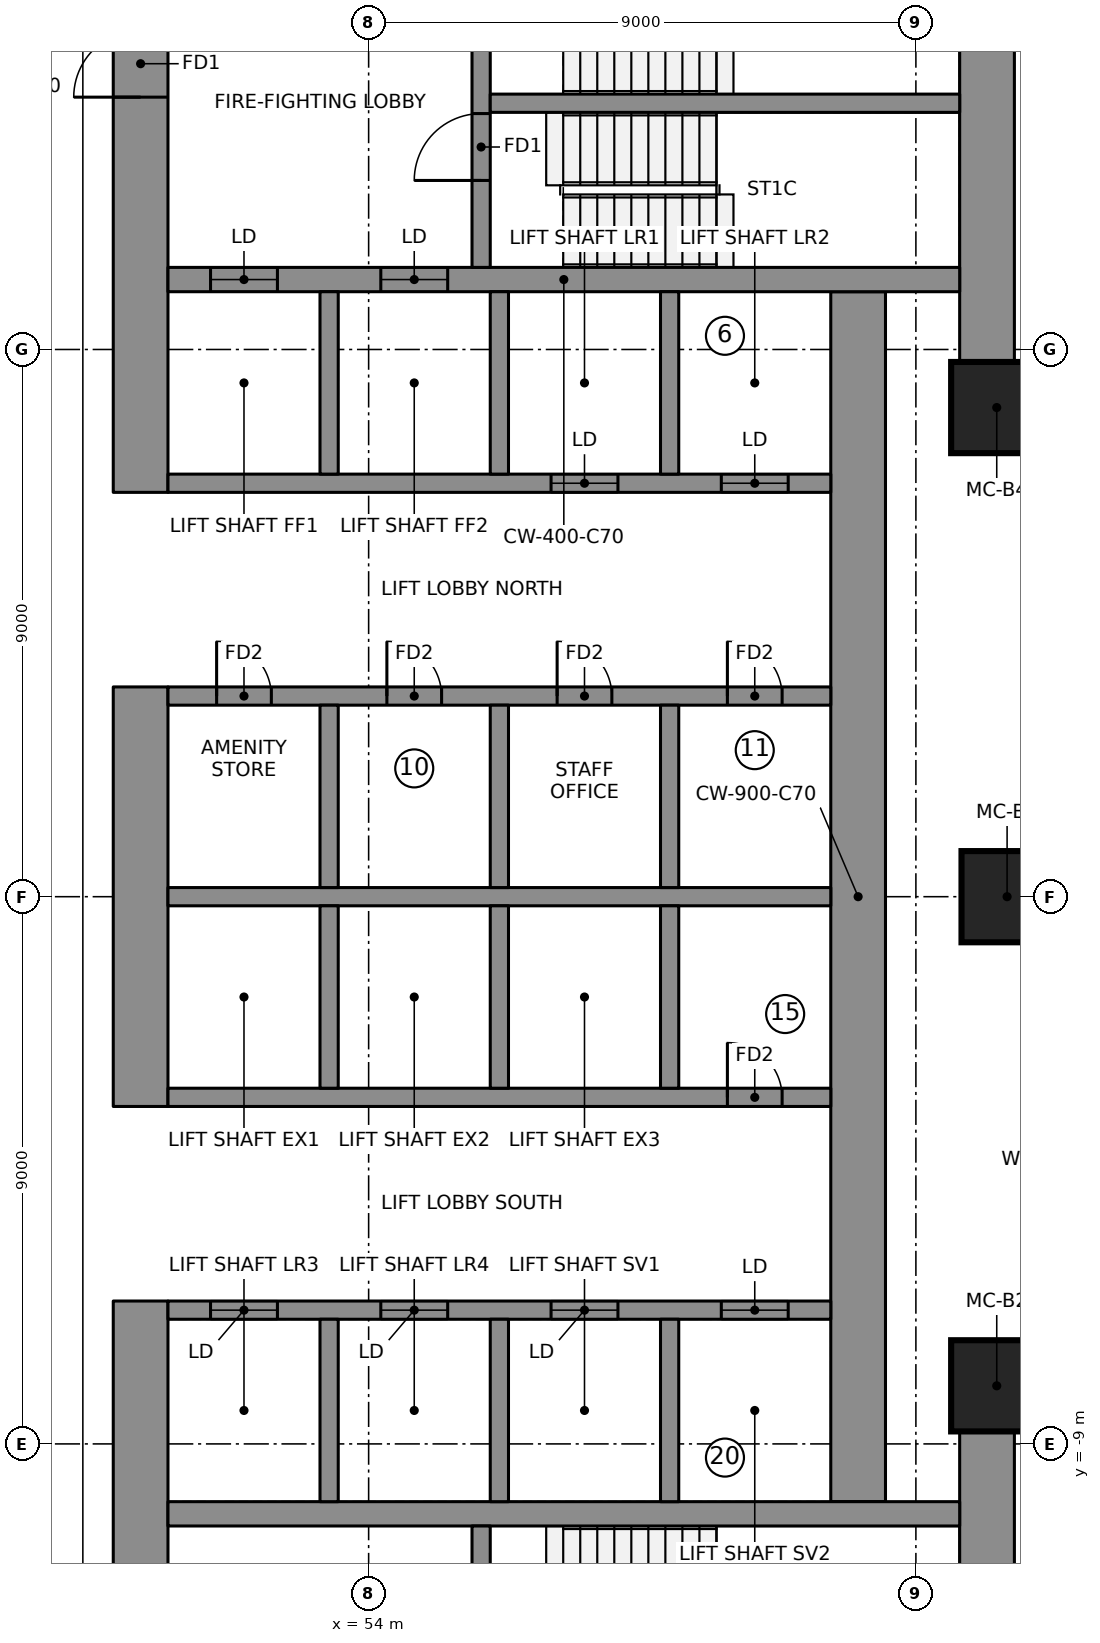
"""IFC4 building model, lengths in metres.
Left out: names, types, materials, properties, quantities, classifications, styles, units other than length and angle.
Written with IfcOpenShell. Run it as: python <this file> out.ifc"""

import sys

from ifc_helpers import new_model, si_unit, direction, frame, frame_2d, origin, origin_2d, place, context, subcontext, project, spatial, rectangle, extrude, element, fill, save


model = new_model("IFC4")
c1 = context("Model", 3, precision=1e-05, world=origin(), true_north=direction((0.0, 1.0)))
c2 = subcontext(c1, "Body", "Model", "MODEL_VIEW")
j1 = project(units=[si_unit("LENGTHUNIT", "METRE"), si_unit("PLANEANGLEUNIT", "RADIAN")], contexts=[c1])
p1 = place(None, origin())
s1 = spatial("IfcSite", under=j1, at=p1, CompositionType="ELEMENT")
p2 = place(p1, origin())
s2 = spatial("IfcBuilding", under=s1, at=p2, CompositionType="ELEMENT")
p3 = place(p2, frame((0.0, 0.0, 162.15)))
s3 = spatial("IfcBuildingStorey", under=s2, at=p3, CompositionType="ELEMENT", Elevation=162.15)
p4 = place(p3, frame((50.25, 6.65, 0.0), z_axis=(0.0, 0.0, 1.0), x_axis=(0.0, 1.0, 0.0)))
e1 = element("IfcWall", 1, at=p4, inside=s3, PredefinedType="SHEAR", context=c2, shape_type="SweptSolid", body=[
    extrude(rectangle(XDim=10.0, YDim=0.9, at=frame_2d((5.0, 0.0))), origin(), (0.0, 0.0, 1.0), 3.55),
])
p5 = place(p4, frame((6.5, 0.0, 0.0)))
e2 = element("IfcOpeningElement", 2, at=p5, cuts=e1, PredefinedType="OPENING", context=c2, shape_type="SweptSolid", body=[
    extrude(rectangle(XDim=1.1, YDim=2.1, at=frame_2d((0.55, 1.05))), frame((0.0, 0.46, 0.0), z_axis=(0.0, -1.0, 0.0), x_axis=(1.0, 0.0, 0.0)), (0.0, 0.0, 1.0), 0.92),
])
p6 = place(p3, frame((50.25, -3.45, 0.0), z_axis=(0.0, 0.0, 1.0), x_axis=(0.0, 1.0, 0.0)))
e3 = element("IfcWall", 3, at=p6, inside=s3, PredefinedType="SHEAR", context=c2, shape_type="SweptSolid", body=[
    extrude(rectangle(XDim=6.9, YDim=0.9, at=frame_2d((3.45, 0.0))), origin(), (0.0, 0.0, 1.0), 3.55),
])
p7 = place(p3, frame((50.25, -16.65, 0.0), z_axis=(0.0, 0.0, 1.0), x_axis=(0.0, 1.0, 0.0)))
e4 = element("IfcWall", 4, at=p7, inside=s3, PredefinedType="SHEAR", context=c2, shape_type="SweptSolid", body=[
    extrude(rectangle(XDim=10.0, YDim=0.9, at=frame_2d((5.0, 0.0))), origin(), (0.0, 0.0, 1.0), 3.55),
])
p8 = place(p7, frame((2.4, 0.0, 0.0)))
e5 = element("IfcOpeningElement", 5, at=p8, cuts=e4, PredefinedType="OPENING", context=c2, shape_type="SweptSolid", body=[
    extrude(rectangle(XDim=1.1, YDim=2.1, at=frame_2d((0.55, 1.05))), frame((0.0, 0.46, 0.0), z_axis=(0.0, -1.0, 0.0), x_axis=(1.0, 0.0, 0.0)), (0.0, 0.0, 1.0), 0.92),
])
for number, where, z_axis, x_axis in (
    (6, (64.17, 8.745, 0.0), (0.0, 0.0, 1.0), (0.0, 1.0, 0.0)),
    (7, (64.17, -15.75, 0.0), (0.0, 0.0, 1.0), (0.0, 1.0, 0.0)),
):
    element("IfcWall", number, at=place(p3, frame(where, z_axis=z_axis, x_axis=x_axis)), inside=s3, PredefinedType="SHEAR", context=c2, shape_type="SweptSolid", body=[
        extrude(rectangle(XDim=7.005, YDim=0.9, at=frame_2d((3.503, 0.0))), origin(), (0.0, 0.0, 1.0), 3.55),
    ])
p9 = place(p3, frame((62.05, -9.95, 0.0), z_axis=(0.0, 0.0, 1.0), x_axis=(0.0, 1.0, 0.0)))
e8 = element("IfcWall", 8, at=p9, inside=s3, PredefinedType="SHEAR", context=c2, shape_type="SweptSolid", body=[
    extrude(rectangle(XDim=19.9, YDim=0.9, at=frame_2d((9.95, 0.0))), origin(), (0.0, 0.0, 1.0), 3.55),
])
p10 = place(p3, frame((50.7, 10.15, 0.0), z_axis=(0.0, 0.0, 1.0), x_axis=(1.0, 0.0, 0.0)))
e9 = element("IfcWall", 9, at=p10, inside=s3, PredefinedType="SHEAR", context=c2, shape_type="SweptSolid", body=[
    extrude(rectangle(XDim=13.02, YDim=0.4, at=frame_2d((6.51, 0.0))), origin(), (0.0, 0.0, 1.0), 3.55),
])
p11 = place(p10, frame((0.7, 0.0, 0.0)))
e10 = element("IfcOpeningElement", 10, at=p11, cuts=e9, PredefinedType="OPENING", context=c2, shape_type="SweptSolid", body=[
    extrude(rectangle(XDim=1.1, YDim=2.1, at=frame_2d((0.55, 1.05))), frame((0.0, 0.21, 0.0), z_axis=(0.0, -1.0, 0.0), x_axis=(1.0, 0.0, 0.0)), (0.0, 0.0, 1.0), 0.42),
])
p12 = place(p10, frame((3.5, 0.0, 0.0)))
e11 = element("IfcOpeningElement", 11, at=p12, cuts=e9, PredefinedType="OPENING", context=c2, shape_type="SweptSolid", body=[
    extrude(rectangle(XDim=1.1, YDim=2.1, at=frame_2d((0.55, 1.05))), frame((0.0, 0.21, 0.0), z_axis=(0.0, -1.0, 0.0), x_axis=(1.0, 0.0, 0.0)), (0.0, 0.0, 1.0), 0.42),
])
p13 = place(p3, frame((50.7, -10.15, 0.0), z_axis=(0.0, 0.0, 1.0), x_axis=(1.0, 0.0, 0.0)))
e12 = element("IfcWall", 12, at=p13, inside=s3, PredefinedType="SHEAR", context=c2, shape_type="SweptSolid", body=[
    extrude(rectangle(XDim=13.02, YDim=0.4, at=frame_2d((6.51, 0.0))), origin(), (0.0, 0.0, 1.0), 3.55),
])
p14 = place(p3, frame((50.7, 0.0, 0.0), z_axis=(0.0, 0.0, 1.0), x_axis=(1.0, 0.0, 0.0)))
e13 = element("IfcWall", 13, at=p14, inside=s3, PredefinedType="SHEAR", context=c2, shape_type="SweptSolid", body=[
    extrude(rectangle(XDim=10.9, YDim=0.3, at=frame_2d((5.45, 0.0))), origin(), (0.0, 0.0, 1.0), 3.55),
])
p15 = place(p3, frame((50.7, 3.3, 0.0), z_axis=(0.0, 0.0, 1.0), x_axis=(1.0, 0.0, 0.0)))
e14 = element("IfcWall", 14, at=p15, inside=s3, PredefinedType="SHEAR", context=c2, shape_type="SweptSolid", body=[
    extrude(rectangle(XDim=10.9, YDim=0.3, at=frame_2d((5.45, 0.0))), origin(), (0.0, 0.0, 1.0), 3.55),
])
p16 = place(p15, frame((0.8, 0.0, 0.0)))
e15 = element("IfcOpeningElement", 15, at=p16, cuts=e14, PredefinedType="OPENING", context=c2, shape_type="SweptSolid", body=[
    extrude(rectangle(XDim=0.9, YDim=2.1, at=frame_2d((0.45, 1.05))), frame((0.0, 0.16, 0.0), z_axis=(0.0, -1.0, 0.0), x_axis=(1.0, 0.0, 0.0)), (0.0, 0.0, 1.0), 0.32),
])
p17 = place(p15, frame((3.6, 0.0, 0.0)))
e16 = element("IfcOpeningElement", 16, at=p17, cuts=e14, PredefinedType="OPENING", context=c2, shape_type="SweptSolid", body=[
    extrude(rectangle(XDim=0.9, YDim=2.1, at=frame_2d((0.45, 1.05))), frame((0.0, 0.16, 0.0), z_axis=(0.0, -1.0, 0.0), x_axis=(1.0, 0.0, 0.0)), (0.0, 0.0, 1.0), 0.32),
])
p18 = place(p15, frame((6.4, 0.0, 0.0)))
e17 = element("IfcOpeningElement", 17, at=p18, cuts=e14, PredefinedType="OPENING", context=c2, shape_type="SweptSolid", body=[
    extrude(rectangle(XDim=0.9, YDim=2.1, at=frame_2d((0.45, 1.05))), frame((0.0, 0.16, 0.0), z_axis=(0.0, -1.0, 0.0), x_axis=(1.0, 0.0, 0.0)), (0.0, 0.0, 1.0), 0.32),
])
p19 = place(p15, frame((9.2, 0.0, 0.0)))
e18 = element("IfcOpeningElement", 18, at=p19, cuts=e14, PredefinedType="OPENING", context=c2, shape_type="SweptSolid", body=[
    extrude(rectangle(XDim=0.9, YDim=2.1, at=frame_2d((0.45, 1.05))), frame((0.0, 0.16, 0.0), z_axis=(0.0, -1.0, 0.0), x_axis=(1.0, 0.0, 0.0)), (0.0, 0.0, 1.0), 0.32),
])
p20 = place(p3, frame((50.7, 6.8, 0.0), z_axis=(0.0, 0.0, 1.0), x_axis=(1.0, 0.0, 0.0)))
e19 = element("IfcWall", 19, at=p20, inside=s3, PredefinedType="SHEAR", context=c2, shape_type="SweptSolid", body=[
    extrude(rectangle(XDim=10.9, YDim=0.3, at=frame_2d((5.45, 0.0))), origin(), (0.0, 0.0, 1.0), 3.55),
])
p21 = place(p20, frame((6.3, 0.0, 0.0)))
e20 = element("IfcOpeningElement", 20, at=p21, cuts=e19, PredefinedType="OPENING", context=c2, shape_type="SweptSolid", body=[
    extrude(rectangle(XDim=1.1, YDim=2.1, at=frame_2d((0.55, 1.05))), frame((0.0, 0.16, 0.0), z_axis=(0.0, -1.0, 0.0), x_axis=(1.0, 0.0, 0.0)), (0.0, 0.0, 1.0), 0.32),
])
p22 = place(p20, frame((9.1, 0.0, 0.0)))
e21 = element("IfcOpeningElement", 21, at=p22, cuts=e19, PredefinedType="OPENING", context=c2, shape_type="SweptSolid", body=[
    extrude(rectangle(XDim=1.1, YDim=2.1, at=frame_2d((0.55, 1.05))), frame((0.0, 0.16, 0.0), z_axis=(0.0, -1.0, 0.0), x_axis=(1.0, 0.0, 0.0)), (0.0, 0.0, 1.0), 0.32),
])
for number, where, z_axis, x_axis in (
    (22, (53.35, 0.15, 0.0), (0.0, 0.0, 1.0), (0.0, 1.0, 0.0)),
    (23, (53.35, 6.95, 0.0), (0.0, 0.0, 1.0), (0.0, 1.0, 0.0)),
    (24, (56.15, 0.15, 0.0), (0.0, 0.0, 1.0), (0.0, 1.0, 0.0)),
    (25, (56.15, 6.95, 0.0), (0.0, 0.0, 1.0), (0.0, 1.0, 0.0)),
    (26, (58.95, 0.15, 0.0), (0.0, 0.0, 1.0), (0.0, 1.0, 0.0)),
    (27, (58.95, 6.95, 0.0), (0.0, 0.0, 1.0), (0.0, 1.0, 0.0)),
):
    element("IfcWall", number, at=place(p3, frame(where, z_axis=z_axis, x_axis=x_axis)), inside=s3, PredefinedType="SHEAR", context=c2, shape_type="SweptSolid", body=[
        extrude(rectangle(XDim=3.0, YDim=0.3, at=frame_2d((1.5, 0.0))), origin(), (0.0, 0.0, 1.0), 3.55),
    ])
p23 = place(p3, frame((50.7, -3.3, 0.0), z_axis=(0.0, 0.0, 1.0), x_axis=(1.0, 0.0, 0.0)))
e28 = element("IfcWall", 28, at=p23, inside=s3, PredefinedType="SHEAR", context=c2, shape_type="SweptSolid", body=[
    extrude(rectangle(XDim=10.9, YDim=0.3, at=frame_2d((5.45, 0.0))), origin(), (0.0, 0.0, 1.0), 3.55),
])
p24 = place(p23, frame((9.2, 0.0, 0.0)))
e29 = element("IfcOpeningElement", 29, at=p24, cuts=e28, PredefinedType="OPENING", context=c2, shape_type="SweptSolid", body=[
    extrude(rectangle(XDim=0.9, YDim=2.1, at=frame_2d((0.45, 1.05))), frame((0.0, 0.16, 0.0), z_axis=(0.0, -1.0, 0.0), x_axis=(1.0, 0.0, 0.0)), (0.0, 0.0, 1.0), 0.32),
])
p25 = place(p3, frame((50.7, -6.8, 0.0), z_axis=(0.0, 0.0, 1.0), x_axis=(1.0, 0.0, 0.0)))
e30 = element("IfcWall", 30, at=p25, inside=s3, PredefinedType="SHEAR", context=c2, shape_type="SweptSolid", body=[
    extrude(rectangle(XDim=10.9, YDim=0.3, at=frame_2d((5.45, 0.0))), origin(), (0.0, 0.0, 1.0), 3.55),
])
p26 = place(p25, frame((0.7, 0.0, 0.0)))
e31 = element("IfcOpeningElement", 31, at=p26, cuts=e30, PredefinedType="OPENING", context=c2, shape_type="SweptSolid", body=[
    extrude(rectangle(XDim=1.1, YDim=2.1, at=frame_2d((0.55, 1.05))), frame((0.0, 0.16, 0.0), z_axis=(0.0, -1.0, 0.0), x_axis=(1.0, 0.0, 0.0)), (0.0, 0.0, 1.0), 0.32),
])
p27 = place(p25, frame((3.5, 0.0, 0.0)))
e32 = element("IfcOpeningElement", 32, at=p27, cuts=e30, PredefinedType="OPENING", context=c2, shape_type="SweptSolid", body=[
    extrude(rectangle(XDim=1.1, YDim=2.1, at=frame_2d((0.55, 1.05))), frame((0.0, 0.16, 0.0), z_axis=(0.0, -1.0, 0.0), x_axis=(1.0, 0.0, 0.0)), (0.0, 0.0, 1.0), 0.32),
])
p28 = place(p25, frame((6.3, 0.0, 0.0)))
e33 = element("IfcOpeningElement", 33, at=p28, cuts=e30, PredefinedType="OPENING", context=c2, shape_type="SweptSolid", body=[
    extrude(rectangle(XDim=1.1, YDim=2.1, at=frame_2d((0.55, 1.05))), frame((0.0, 0.16, 0.0), z_axis=(0.0, -1.0, 0.0), x_axis=(1.0, 0.0, 0.0)), (0.0, 0.0, 1.0), 0.32),
])
p29 = place(p25, frame((9.1, 0.0, 0.0)))
e34 = element("IfcOpeningElement", 34, at=p29, cuts=e30, PredefinedType="OPENING", context=c2, shape_type="SweptSolid", body=[
    extrude(rectangle(XDim=1.1, YDim=2.1, at=frame_2d((0.55, 1.05))), frame((0.0, 0.16, 0.0), z_axis=(0.0, -1.0, 0.0), x_axis=(1.0, 0.0, 0.0)), (0.0, 0.0, 1.0), 0.32),
])
for number, where, z_axis, x_axis in (
    (35, (53.35, -3.15, 0.0), (0.0, 0.0, 1.0), (0.0, 1.0, 0.0)),
    (36, (53.35, -9.95, 0.0), (0.0, 0.0, 1.0), (0.0, 1.0, 0.0)),
    (37, (56.15, -3.15, 0.0), (0.0, 0.0, 1.0), (0.0, 1.0, 0.0)),
    (38, (56.15, -9.95, 0.0), (0.0, 0.0, 1.0), (0.0, 1.0, 0.0)),
    (39, (58.95, -3.15, 0.0), (0.0, 0.0, 1.0), (0.0, 1.0, 0.0)),
    (40, (58.95, -9.95, 0.0), (0.0, 0.0, 1.0), (0.0, 1.0, 0.0)),
):
    element("IfcWall", number, at=place(p3, frame(where, z_axis=z_axis, x_axis=x_axis)), inside=s3, PredefinedType="SHEAR", context=c2, shape_type="SweptSolid", body=[
        extrude(rectangle(XDim=3.0, YDim=0.3, at=frame_2d((1.5, 0.0))), origin(), (0.0, 0.0, 1.0), 3.55),
    ])
p30 = place(p3, frame((55.85, 10.35, 0.0), z_axis=(0.0, 0.0, 1.0), x_axis=(0.0, 1.0, 0.0)))
e41 = element("IfcWall", 41, at=p30, inside=s3, PredefinedType="SHEAR", context=c2, shape_type="SweptSolid", body=[
    extrude(rectangle(XDim=5.4, YDim=0.3, at=frame_2d((2.7, 0.0))), origin(), (0.0, 0.0, 1.0), 3.55),
])
p31 = place(p30, frame((1.43, 0.0, 0.0)))
e42 = element("IfcOpeningElement", 42, at=p31, cuts=e41, PredefinedType="OPENING", context=c2, shape_type="SweptSolid", body=[
    extrude(rectangle(XDim=1.1, YDim=2.1, at=frame_2d((0.55, 1.05))), frame((0.0, 0.16, 0.0), z_axis=(0.0, -1.0, 0.0), x_axis=(1.0, 0.0, 0.0)), (0.0, 0.0, 1.0), 0.32),
])
p32 = place(p30, frame((3.6, 0.0, 0.0)))
e43 = element("IfcOpeningElement", 43, at=p32, cuts=e41, PredefinedType="OPENING", context=c2, shape_type="SweptSolid", body=[
    extrude(rectangle(XDim=1.1, YDim=2.1, at=frame_2d((0.55, 1.05))), frame((0.0, 0.16, 0.0), z_axis=(0.0, -1.0, 0.0), x_axis=(1.0, 0.0, 0.0)), (0.0, 0.0, 1.0), 0.32),
])
p33 = place(p3, frame((55.85, -15.75, 0.0), z_axis=(0.0, 0.0, 1.0), x_axis=(0.0, 1.0, 0.0)))
e44 = element("IfcWall", 44, at=p33, inside=s3, PredefinedType="SHEAR", context=c2, shape_type="SweptSolid", body=[
    extrude(rectangle(XDim=5.4, YDim=0.3, at=frame_2d((2.7, 0.0))), origin(), (0.0, 0.0, 1.0), 3.55),
])
p34 = place(p33, frame((3.6, 0.0, 0.0)))
e45 = element("IfcOpeningElement", 45, at=p34, cuts=e44, PredefinedType="OPENING", context=c2, shape_type="SweptSolid", body=[
    extrude(rectangle(XDim=1.1, YDim=2.1, at=frame_2d((0.55, 1.05))), frame((0.0, 0.16, 0.0), z_axis=(0.0, -1.0, 0.0), x_axis=(1.0, 0.0, 0.0)), (0.0, 0.0, 1.0), 0.32),
])
p35 = place(p33, frame((0.8, 0.0, 0.0)))
e46 = element("IfcOpeningElement", 46, at=p35, cuts=e44, PredefinedType="OPENING", context=c2, shape_type="SweptSolid", body=[
    extrude(rectangle(XDim=0.9, YDim=2.1, at=frame_2d((0.45, 1.05))), frame((0.0, 0.16, 0.0), z_axis=(0.0, -1.0, 0.0), x_axis=(1.0, 0.0, 0.0)), (0.0, 0.0, 1.0), 0.32),
])
p36 = place(p3, frame((56.0, 13.05, 0.0), z_axis=(0.0, 0.0, 1.0), x_axis=(1.0, 0.0, 0.0)))
e47 = element("IfcWall", 47, at=p36, inside=s3, PredefinedType="SHEAR", context=c2, shape_type="SweptSolid", body=[
    extrude(rectangle(XDim=7.72, YDim=0.3, at=frame_2d((3.86, 0.0))), origin(), (0.0, 0.0, 1.0), 3.55),
])
for number, where, z_axis, x_axis in (
    (48, (64.33, -8.045, 0.0), (0.0, 0.0, 1.0), (1.0, 0.0, 0.0)),
    (49, (64.5, 0.0, 0.0), (0.0, 0.0, 1.0), (1.0, 0.0, 0.0)),
    (50, (64.33, 8.045, 0.0), (0.0, 0.0, 1.0), (1.0, 0.0, 0.0)),
):
    element("IfcColumn", number, at=place(p3, frame(where, z_axis=z_axis, x_axis=x_axis)), inside=s3, PredefinedType="COLUMN", context=c2, shape_type="SweptSolid", body=[
        extrude(rectangle(XDim=1.5, YDim=1.5, at=origin_2d()), origin(), (0.0, 0.0, 1.0), 3.55),
    ])
p37 = place(p11, origin())
e51 = element("IfcDoor", 51, at=p37, inside=s3, OperationType="DOUBLE_DOOR_SLIDING", PredefinedType="DOOR", context=c2, shape_type="SweptSolid", body=[
    extrude(rectangle(XDim=1.1, YDim=2.1, at=frame_2d((0.55, 1.05))), frame((0.0, 0.025, 0.0), z_axis=(0.0, -1.0, 0.0), x_axis=(1.0, 0.0, 0.0)), (0.0, 0.0, 1.0), 0.05),
])
fill(e10, e51)
p38 = place(p12, origin())
e52 = element("IfcDoor", 52, at=p38, inside=s3, OperationType="DOUBLE_DOOR_SLIDING", PredefinedType="DOOR", context=c2, shape_type="SweptSolid", body=[
    extrude(rectangle(XDim=1.1, YDim=2.1, at=frame_2d((0.55, 1.05))), frame((0.0, 0.025, 0.0), z_axis=(0.0, -1.0, 0.0), x_axis=(1.0, 0.0, 0.0)), (0.0, 0.0, 1.0), 0.05),
])
fill(e11, e52)
p39 = place(p21, origin())
e53 = element("IfcDoor", 53, at=p39, inside=s3, OperationType="DOUBLE_DOOR_SLIDING", PredefinedType="DOOR", context=c2, shape_type="SweptSolid", body=[
    extrude(rectangle(XDim=1.1, YDim=2.1, at=frame_2d((0.55, 1.05))), frame((0.0, 0.025, 0.0), z_axis=(0.0, -1.0, 0.0), x_axis=(1.0, 0.0, 0.0)), (0.0, 0.0, 1.0), 0.05),
])
fill(e20, e53)
p40 = place(p22, origin())
e54 = element("IfcDoor", 54, at=p40, inside=s3, OperationType="DOUBLE_DOOR_SLIDING", PredefinedType="DOOR", context=c2, shape_type="SweptSolid", body=[
    extrude(rectangle(XDim=1.1, YDim=2.1, at=frame_2d((0.55, 1.05))), frame((0.0, 0.025, 0.0), z_axis=(0.0, -1.0, 0.0), x_axis=(1.0, 0.0, 0.0)), (0.0, 0.0, 1.0), 0.05),
])
fill(e21, e54)
p41 = place(p26, origin())
e55 = element("IfcDoor", 55, at=p41, inside=s3, OperationType="DOUBLE_DOOR_SLIDING", PredefinedType="DOOR", context=c2, shape_type="SweptSolid", body=[
    extrude(rectangle(XDim=1.1, YDim=2.1, at=frame_2d((0.55, 1.05))), frame((0.0, 0.025, 0.0), z_axis=(0.0, -1.0, 0.0), x_axis=(1.0, 0.0, 0.0)), (0.0, 0.0, 1.0), 0.05),
])
fill(e31, e55)
p42 = place(p27, origin())
e56 = element("IfcDoor", 56, at=p42, inside=s3, OperationType="DOUBLE_DOOR_SLIDING", PredefinedType="DOOR", context=c2, shape_type="SweptSolid", body=[
    extrude(rectangle(XDim=1.1, YDim=2.1, at=frame_2d((0.55, 1.05))), frame((0.0, 0.025, 0.0), z_axis=(0.0, -1.0, 0.0), x_axis=(1.0, 0.0, 0.0)), (0.0, 0.0, 1.0), 0.05),
])
fill(e32, e56)
p43 = place(p28, origin())
e57 = element("IfcDoor", 57, at=p43, inside=s3, OperationType="DOUBLE_DOOR_SLIDING", PredefinedType="DOOR", context=c2, shape_type="SweptSolid", body=[
    extrude(rectangle(XDim=1.1, YDim=2.1, at=frame_2d((0.55, 1.05))), frame((0.0, 0.025, 0.0), z_axis=(0.0, -1.0, 0.0), x_axis=(1.0, 0.0, 0.0)), (0.0, 0.0, 1.0), 0.05),
])
fill(e33, e57)
p44 = place(p29, origin())
e58 = element("IfcDoor", 58, at=p44, inside=s3, OperationType="DOUBLE_DOOR_SLIDING", PredefinedType="DOOR", context=c2, shape_type="SweptSolid", body=[
    extrude(rectangle(XDim=1.1, YDim=2.1, at=frame_2d((0.55, 1.05))), frame((0.0, 0.025, 0.0), z_axis=(0.0, -1.0, 0.0), x_axis=(1.0, 0.0, 0.0)), (0.0, 0.0, 1.0), 0.05),
])
fill(e34, e58)
p45 = place(p31, origin())
e59 = element("IfcDoor", 59, at=p45, inside=s3, OperationType="SINGLE_SWING_RIGHT", PredefinedType="DOOR", context=c2, shape_type="SweptSolid", body=[
    extrude(rectangle(XDim=1.1, YDim=2.1, at=frame_2d((0.55, 1.05))), frame((0.0, 0.025, 0.0), z_axis=(0.0, -1.0, 0.0), x_axis=(1.0, 0.0, 0.0)), (0.0, 0.0, 1.0), 0.05),
])
fill(e42, e59)
p46 = place(p5, origin())
e60 = element("IfcDoor", 60, at=p46, inside=s3, OperationType="SINGLE_SWING_RIGHT", PredefinedType="DOOR", context=c2, shape_type="SweptSolid", body=[
    extrude(rectangle(XDim=1.1, YDim=2.1, at=frame_2d((0.55, 1.05))), frame((0.0, 0.025, 0.0), z_axis=(0.0, -1.0, 0.0), x_axis=(1.0, 0.0, 0.0)), (0.0, 0.0, 1.0), 0.05),
])
fill(e2, e60)
p47 = place(p16, origin())
e61 = element("IfcDoor", 61, at=p47, inside=s3, OperationType="SINGLE_SWING_LEFT", PredefinedType="DOOR", context=c2, shape_type="SweptSolid", body=[
    extrude(rectangle(XDim=0.9, YDim=2.1, at=frame_2d((0.45, 1.05))), frame((0.0, 0.025, 0.0), z_axis=(0.0, -1.0, 0.0), x_axis=(1.0, 0.0, 0.0)), (0.0, 0.0, 1.0), 0.05),
])
fill(e15, e61)
p48 = place(p17, origin())
e62 = element("IfcDoor", 62, at=p48, inside=s3, OperationType="SINGLE_SWING_LEFT", PredefinedType="DOOR", context=c2, shape_type="SweptSolid", body=[
    extrude(rectangle(XDim=0.9, YDim=2.1, at=frame_2d((0.45, 1.05))), frame((0.0, 0.025, 0.0), z_axis=(0.0, -1.0, 0.0), x_axis=(1.0, 0.0, 0.0)), (0.0, 0.0, 1.0), 0.05),
])
fill(e16, e62)
p49 = place(p18, origin())
e63 = element("IfcDoor", 63, at=p49, inside=s3, OperationType="SINGLE_SWING_LEFT", PredefinedType="DOOR", context=c2, shape_type="SweptSolid", body=[
    extrude(rectangle(XDim=0.9, YDim=2.1, at=frame_2d((0.45, 1.05))), frame((0.0, 0.025, 0.0), z_axis=(0.0, -1.0, 0.0), x_axis=(1.0, 0.0, 0.0)), (0.0, 0.0, 1.0), 0.05),
])
fill(e17, e63)
p50 = place(p19, origin())
e64 = element("IfcDoor", 64, at=p50, inside=s3, OperationType="SINGLE_SWING_LEFT", PredefinedType="DOOR", context=c2, shape_type="SweptSolid", body=[
    extrude(rectangle(XDim=0.9, YDim=2.1, at=frame_2d((0.45, 1.05))), frame((0.0, 0.025, 0.0), z_axis=(0.0, -1.0, 0.0), x_axis=(1.0, 0.0, 0.0)), (0.0, 0.0, 1.0), 0.05),
])
fill(e18, e64)
p51 = place(p24, origin())
e65 = element("IfcDoor", 65, at=p51, inside=s3, OperationType="SINGLE_SWING_LEFT", PredefinedType="DOOR", context=c2, shape_type="SweptSolid", body=[
    extrude(rectangle(XDim=0.9, YDim=2.1, at=frame_2d((0.45, 1.05))), frame((0.0, 0.025, 0.0), z_axis=(0.0, -1.0, 0.0), x_axis=(1.0, 0.0, 0.0)), (0.0, 0.0, 1.0), 0.05),
])
fill(e29, e65)
save(model, sys.argv[1])
